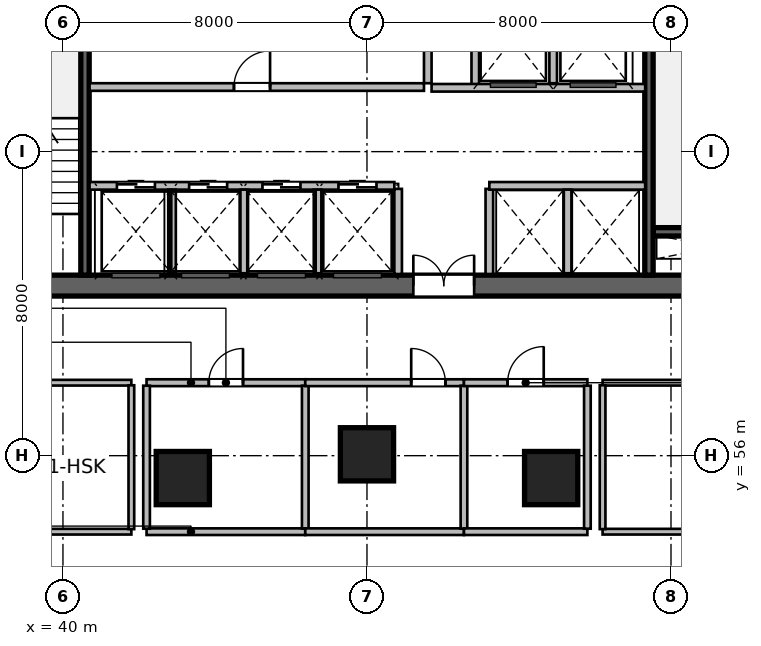
"""IFC4 building model, lengths in metres.
Left out: names, types, materials, properties, quantities, classifications, styles, units other than length and angle.
Written with IfcOpenShell. Run it as: python <this file> out.ifc"""

import sys

from ifc_helpers import new_model, si_unit, direction, frame, frame_2d, origin, origin_2d, place, context, subcontext, project, spatial, rectangle, circle, extrude, source, transform, mapped, element, fill, save


model = new_model("IFC4")
c1 = context("Model", 3, precision=1e-05, world=origin(), true_north=direction((0.0, 1.0)))
c2 = subcontext(c1, "Body", "Model", "MODEL_VIEW")
j1 = project(units=[si_unit("LENGTHUNIT", "METRE"), si_unit("PLANEANGLEUNIT", "RADIAN")], contexts=[c1])
p1 = place(None, origin())
s1 = spatial("IfcSite", under=j1, at=p1, CompositionType="ELEMENT")
p2 = place(p1, origin())
s2 = spatial("IfcBuilding", under=s1, at=p2, CompositionType="ELEMENT")
p3 = place(p2, frame((0.0, 0.0, 53.4)))
s3 = spatial("IfcBuildingStorey", under=s2, at=p3, CompositionType="ELEMENT", Elevation=53.4)
m1 = source(origin(), c2, "Body", "SweptSolid", [
    extrude(rectangle(XDim=21.6, YDim=0.55, at=frame_2d((10.8, 0.0))), origin(), (0.0, 0.0, 1.0), 3.6),
])
p4 = place(p3, frame((37.2, 60.475, 0.0), z_axis=(0.0, 0.0, 1.0), x_axis=(1.0, 0.0, 0.0)))
e1 = element("IfcWall", 1, at=p4, inside=s3, PredefinedType="SHEAR", context=c2, shape_type="MappedRepresentation", body=[
    mapped(m1, transform((0.0, 0.0, 0.0), scale=1.0)),
])
p5 = place(p4, frame((1.1, 0.0, 0.0)))
e2 = element("IfcOpeningElement", 2, at=p5, cuts=e1, PredefinedType="OPENING", context=c2, shape_type="SweptSolid", body=[
    extrude(rectangle(XDim=1.15, YDim=2.15, at=frame_2d((0.575, 1.075))), frame((0.0, 0.285, 0.0), z_axis=(0.0, -1.0, 0.0), x_axis=(1.0, 0.0, 0.0)), (0.0, 0.0, 1.0), 0.57),
])
p6 = place(p4, frame((19.5, 0.0, 0.0)))
e3 = element("IfcOpeningElement", 3, at=p6, cuts=e1, PredefinedType="OPENING", context=c2, shape_type="SweptSolid", body=[
    extrude(rectangle(XDim=0.9, YDim=2.1, at=frame_2d((0.45, 1.05))), frame((0.0, 0.285, 0.0), z_axis=(0.0, -1.0, 0.0), x_axis=(1.0, 0.0, 0.0)), (0.0, 0.0, 1.0), 0.57),
])
p7 = place(p4, frame((12.02, 0.0, 0.0)))
e4 = element("IfcOpeningElement", 4, at=p7, cuts=e1, PredefinedType="OPENING", context=c2, shape_type="SweptSolid", body=[
    extrude(rectangle(XDim=1.6, YDim=2.15, at=frame_2d((0.8, 1.075))), frame((0.0, 0.285, 0.0), z_axis=(0.0, -1.0, 0.0), x_axis=(1.0, 0.0, 0.0)), (0.0, 0.0, 1.0), 0.57),
])
m2 = source(origin(), c2, "Body", "SweptSolid", [
    extrude(rectangle(XDim=3.27, YDim=0.22, at=frame_2d((1.635, 0.0))), origin(), (0.0, 0.0, 1.0), 3.6),
])
p8 = place(p3, frame((55.53, 61.89, 0.0), z_axis=(0.0, 0.0, 1.0), x_axis=(1.0, 0.0, 0.0)))
e5 = element("IfcWall", 5, at=p8, inside=s3, PredefinedType="SHEAR", context=c2, shape_type="MappedRepresentation", body=[
    mapped(m2, transform((0.0, 0.0, 0.0), scale=1.0)),
])
m3 = source(origin(), c2, "Body", "SweptSolid", [
    extrude(rectangle(XDim=10.9, YDim=0.22, at=frame_2d((5.45, 0.0))), origin(), (0.0, 0.0, 1.0), 3.6),
])
p9 = place(p3, frame((40.58, 60.75, 0.0), z_axis=(0.0, 0.0, 1.0), x_axis=(0.0, 1.0, 0.0)))
e6 = element("IfcWall", 6, at=p9, inside=s3, PredefinedType="SHEAR", context=c2, shape_type="MappedRepresentation", body=[
    mapped(m3, transform((0.0, 0.0, 0.0), scale=1.0)),
])
p10 = place(p3, frame((55.42, 60.75, 0.0), z_axis=(0.0, 0.0, 1.0), x_axis=(0.0, 1.0, 0.0)))
e7 = element("IfcWall", 7, at=p10, inside=s3, PredefinedType="SHEAR", context=c2, shape_type="MappedRepresentation", body=[
    mapped(m3, transform((0.0, 0.0, 0.0), scale=1.0)),
])
p11 = place(p10, frame((9.495, 0.0, 0.0)))
e8 = element("IfcOpeningElement", 8, at=p11, cuts=e7, PredefinedType="OPENING", context=c2, shape_type="SweptSolid", body=[
    extrude(rectangle(XDim=1.15, YDim=2.15, at=frame_2d((0.575, 1.075))), frame((0.0, 0.12, 0.0), z_axis=(0.0, -1.0, 0.0), x_axis=(1.0, 0.0, 0.0)), (0.0, 0.0, 1.0), 0.24),
])
m4 = source(origin(), c2, "Body", "SweptSolid", [
    extrude(circle(Radius=0.7, at=origin_2d()), origin(), (0.0, 0.0, 1.0), 3.6),
])
for number, where, z_axis, x_axis in (
    (9, (43.154, 55.411, 0.0), (0.0, 0.0, 1.0), (-0.143, 0.99, 0.0)),
    (10, (48.0, 56.036, 0.0), (0.0, 0.0, 1.0), (0.0, 1.0, 0.0)),
    (11, (52.846, 55.411, 0.0), (0.0, 0.0, 1.0), (0.143, 0.99, 0.0)),
):
    element("IfcColumn", number, at=place(p3, frame(where, z_axis=z_axis, x_axis=x_axis)), inside=s3, PredefinedType="COLUMN", context=c2, shape_type="MappedRepresentation", body=[
        mapped(m4, transform((0.0, 0.0, 0.0), scale=1.0)),
    ])
m5 = source(origin(), c2, "Body", "SweptSolid", [
    extrude(rectangle(XDim=2.24, YDim=0.2, at=frame_2d((1.12, 0.0))), origin(), (0.0, 0.0, 1.0), 3.36),
])
for number, where, z_axis, x_axis in (
    (12, (48.82, 60.78, 0.0), (0.0, 0.0, 1.0), (0.0, 1.0, 0.0)),
    (13, (51.22, 60.78, 0.0), (0.0, 0.0, 1.0), (0.0, 1.0, 0.0)),
):
    element("IfcWall", number, at=place(p3, frame(where, z_axis=z_axis, x_axis=x_axis)), inside=s3, PredefinedType="SOLIDWALL", context=c2, shape_type="MappedRepresentation", body=[
        mapped(m5, transform((0.0, 0.0, 0.0), scale=1.0)),
    ])
m6 = source(origin(), c2, "Body", "SweptSolid", [
    extrude(rectangle(XDim=5.8, YDim=0.2, at=frame_2d((2.9, 0.0))), origin(), (0.0, 0.0, 1.0), 3.36),
])
p12 = place(p3, frame((49.6, 65.8, 0.0), z_axis=(0.0, 0.0, 1.0), x_axis=(0.0, 1.0, 0.0)))
e14 = element("IfcWall", 14, at=p12, inside=s3, PredefinedType="SOLIDWALL", context=c2, shape_type="MappedRepresentation", body=[
    mapped(m6, transform((0.0, 0.0, 0.0), scale=1.0)),
])
m7 = source(origin(), c2, "Body", "SweptSolid", [
    extrude(rectangle(XDim=2.58, YDim=0.2, at=frame_2d((1.29, 0.0))), origin(), (0.0, 0.0, 1.0), 3.36),
])
p13 = place(p3, frame((50.85, 65.68, 0.0), z_axis=(0.0, 0.0, 1.0), x_axis=(0.0, 1.0, 0.0)))
e15 = element("IfcWall", 15, at=p13, inside=s3, PredefinedType="SOLIDWALL", context=c2, shape_type="MappedRepresentation", body=[
    mapped(m7, transform((0.0, 0.0, 0.0), scale=1.0)),
])
m8 = source(origin(), c2, "Body", "SweptSolid", [
    extrude(rectangle(XDim=2.4, YDim=0.2, at=frame_2d((1.2, 0.0))), origin(), (0.0, 0.0, 1.0), 3.36),
])
p14 = place(p3, frame((52.9, 65.8, 0.0), z_axis=(0.0, 0.0, 1.0), x_axis=(0.0, 1.0, 0.0)))
e16 = element("IfcWall", 16, at=p14, inside=s3, PredefinedType="SOLIDWALL", context=c2, shape_type="MappedRepresentation", body=[
    mapped(m8, transform((0.0, 0.0, 0.0), scale=1.0)),
])
m9 = source(origin(), c2, "Body", "SweptSolid", [
    extrude(rectangle(XDim=5.62, YDim=0.2, at=frame_2d((2.81, 0.0))), origin(), (0.0, 0.0, 1.0), 3.36),
])
p15 = place(p3, frame((49.7, 65.68, 0.0), z_axis=(0.0, 0.0, 1.0), x_axis=(1.0, 0.0, 0.0)))
e17 = element("IfcWall", 17, at=p15, inside=s3, PredefinedType="SOLIDWALL", context=c2, shape_type="MappedRepresentation", body=[
    mapped(m9, transform((0.0, 0.0, 0.0), scale=1.0)),
])
m10 = source(origin(), c2, "Body", "SweptSolid", [
    extrude(rectangle(XDim=8.02, YDim=0.2, at=frame_2d((4.01, 0.0))), origin(), (0.0, 0.0, 1.0), 3.36),
])
p16 = place(p3, frame((40.7, 63.1, 0.0), z_axis=(0.0, 0.0, 1.0), x_axis=(1.0, 0.0, 0.0)))
e18 = element("IfcWall", 18, at=p16, inside=s3, PredefinedType="SOLIDWALL", context=c2, shape_type="MappedRepresentation", body=[
    mapped(m10, transform((0.0, 0.0, 0.0), scale=1.0)),
])
p17 = place(p16, frame((0.72, 0.0, 0.0)))
e19 = element("IfcOpeningElement", 19, at=p17, cuts=e18, PredefinedType="OPENING", context=c2, shape_type="SweptSolid", body=[
    extrude(rectangle(XDim=1.0, YDim=2.15, at=frame_2d((0.5, 1.075))), frame((0.0, 0.11, 0.0), z_axis=(0.0, -1.0, 0.0), x_axis=(1.0, 0.0, 0.0)), (0.0, 0.0, 1.0), 0.22),
])
p18 = place(p16, frame((2.62, 0.0, 0.0)))
e20 = element("IfcOpeningElement", 20, at=p18, cuts=e18, PredefinedType="OPENING", context=c2, shape_type="SweptSolid", body=[
    extrude(rectangle(XDim=1.0, YDim=2.15, at=frame_2d((0.5, 1.075))), frame((0.0, 0.11, 0.0), z_axis=(0.0, -1.0, 0.0), x_axis=(1.0, 0.0, 0.0)), (0.0, 0.0, 1.0), 0.22),
])
p19 = place(p16, frame((4.55, 0.0, 0.0)))
e21 = element("IfcOpeningElement", 21, at=p19, cuts=e18, PredefinedType="OPENING", context=c2, shape_type="SweptSolid", body=[
    extrude(rectangle(XDim=1.0, YDim=2.15, at=frame_2d((0.5, 1.075))), frame((0.0, 0.11, 0.0), z_axis=(0.0, -1.0, 0.0), x_axis=(1.0, 0.0, 0.0)), (0.0, 0.0, 1.0), 0.22),
])
p20 = place(p16, frame((6.55, 0.0, 0.0)))
e22 = element("IfcOpeningElement", 22, at=p20, cuts=e18, PredefinedType="OPENING", context=c2, shape_type="SweptSolid", body=[
    extrude(rectangle(XDim=1.0, YDim=2.15, at=frame_2d((0.5, 1.075))), frame((0.0, 0.11, 0.0), z_axis=(0.0, -1.0, 0.0), x_axis=(1.0, 0.0, 0.0)), (0.0, 0.0, 1.0), 0.22),
])
m11 = source(origin(), c2, "Body", "SweptSolid", [
    extrude(rectangle(XDim=4.1, YDim=0.2, at=frame_2d((2.05, 0.0))), origin(), (0.0, 0.0, 1.0), 3.36),
])
p21 = place(p3, frame((51.22, 63.1, 0.0), z_axis=(0.0, 0.0, 1.0), x_axis=(1.0, 0.0, 0.0)))
e23 = element("IfcWall", 23, at=p21, inside=s3, PredefinedType="SOLIDWALL", context=c2, shape_type="MappedRepresentation", body=[
    mapped(m11, transform((0.0, 0.0, 0.0), scale=1.0)),
])
m12 = source(origin(), c2, "Body", "SweptSolid", [
    extrude(rectangle(XDim=2.2, YDim=0.2, at=frame_2d((1.1, 0.0))), origin(), (0.0, 0.0, 1.0), 3.36),
])
for number, where, z_axis, x_axis in (
    (24, (42.87, 60.8, 0.0), (0.0, 0.0, 1.0), (0.0, 1.0, 0.0)),
    (25, (44.77, 60.8, 0.0), (0.0, 0.0, 1.0), (0.0, 1.0, 0.0)),
    (26, (46.7, 60.8, 0.0), (0.0, 0.0, 1.0), (0.0, 1.0, 0.0)),
    (27, (53.28, 60.8, 0.0), (0.0, 0.0, 1.0), (0.0, 1.0, 0.0)),
):
    element("IfcWall", number, at=place(p3, frame(where, z_axis=z_axis, x_axis=x_axis)), inside=s3, PredefinedType="SOLIDWALL", context=c2, shape_type="MappedRepresentation", body=[
        mapped(m12, transform((0.0, 0.0, 0.0), scale=1.0)),
    ])
m13 = source(origin(), c2, "Body", "SweptSolid", [
    extrude(rectangle(XDim=8.8, YDim=0.2, at=frame_2d((4.4, 0.0))), origin(), (0.0, 0.0, 1.0), 3.36),
])
p22 = place(p3, frame((40.7, 65.7, 0.0), z_axis=(0.0, 0.0, 1.0), x_axis=(1.0, 0.0, 0.0)))
e28 = element("IfcWall", 28, at=p22, inside=s3, PredefinedType="SOLIDWALL", context=c2, shape_type="MappedRepresentation", body=[
    mapped(m13, transform((0.0, 0.0, 0.0), scale=1.0)),
])
p23 = place(p22, frame((3.8, 0.0, 0.0)))
e29 = element("IfcOpeningElement", 29, at=p23, cuts=e28, PredefinedType="OPENING", context=c2, shape_type="SweptSolid", body=[
    extrude(rectangle(XDim=0.95, YDim=2.15, at=frame_2d((0.475, 1.075))), frame((0.0, 0.11, 0.0), z_axis=(0.0, -1.0, 0.0), x_axis=(1.0, 0.0, 0.0)), (0.0, 0.0, 1.0), 0.22),
])
m14 = source(origin(), c2, "Body", "SweptSolid", [
    extrude(rectangle(XDim=6.6, YDim=0.15, at=frame_2d((3.3, 0.0))), origin(), (0.0, 0.0, 1.0), 2.803),
])
p24 = place(p3, frame((35.2, 54.0, 0.0), z_axis=(0.0, 0.0, 1.0), x_axis=(1.0, 0.0, 0.0)))
e30 = element("IfcWall", 30, at=p24, inside=s3, PredefinedType="PARTITIONING", context=c2, shape_type="MappedRepresentation", body=[
    mapped(m14, transform((0.0, 0.0, 0.0), scale=1.0)),
])
m15 = source(origin(), c2, "Body", "SweptSolid", [
    extrude(rectangle(XDim=6.6, YDim=0.15, at=frame_2d((3.3, 0.0))), origin(), (0.0, 0.0, 1.0), 3.36),
])
p25 = place(p3, frame((35.2, 57.92, 0.0), z_axis=(0.0, 0.0, 1.0), x_axis=(1.0, 0.0, 0.0)))
e31 = element("IfcWall", 31, at=p25, inside=s3, PredefinedType="PARTITIONING", context=c2, shape_type="MappedRepresentation", body=[
    mapped(m15, transform((0.0, 0.0, 0.0), scale=1.0)),
])
p26 = place(p25, frame((2.85, 0.0, 0.0)))
e32 = element("IfcOpeningElement", 32, at=p26, cuts=e31, PredefinedType="OPENING", context=c2, shape_type="SweptSolid", body=[
    extrude(rectangle(XDim=0.9, YDim=2.1, at=frame_2d((0.45, 1.05))), frame((0.0, 0.085, 0.0), z_axis=(0.0, -1.0, 0.0), x_axis=(1.0, 0.0, 0.0)), (0.0, 0.0, 1.0), 0.17),
])
m16 = source(origin(), c2, "Body", "SweptSolid", [
    extrude(rectangle(XDim=3.785, YDim=0.15, at=frame_2d((1.893, 0.0))), origin(), (0.0, 0.0, 1.0), 3.36),
])
p27 = place(p3, frame((41.8, 54.067, 0.0), z_axis=(0.0, 0.0, 1.0), x_axis=(0.0, 1.0, 0.0)))
e33 = element("IfcWall", 33, at=p27, inside=s3, PredefinedType="PARTITIONING", context=c2, shape_type="MappedRepresentation", body=[
    mapped(m16, transform((0.0, 0.0, 0.0), scale=1.0)),
])
m17 = source(origin(), c2, "Body", "SweptSolid", [
    extrude(rectangle(XDim=4.176, YDim=0.175, at=frame_2d((2.088, 0.0))), origin(), (0.0, 0.0, 1.0), 3.36),
])
p28 = place(p3, frame((42.2, 54.0, 0.0), z_axis=(0.0, 0.0, 1.0), x_axis=(1.0, 0.0, 0.0)))
e34 = element("IfcWall", 34, at=p28, inside=s3, PredefinedType="PARTITIONING", context=c2, shape_type="MappedRepresentation", body=[
    mapped(m17, transform((0.0, 0.0, 0.0), scale=1.0)),
])
m18 = source(origin(), c2, "Body", "SweptSolid", [
    extrude(rectangle(XDim=4.176, YDim=0.18, at=frame_2d((2.088, 0.0))), origin(), (0.0, 0.0, 1.0), 3.36),
])
p29 = place(p3, frame((42.2, 57.92, 0.0), z_axis=(0.0, 0.0, 1.0), x_axis=(1.0, 0.0, 0.0)))
e35 = element("IfcWall", 35, at=p29, inside=s3, PredefinedType="PLUMBINGWALL", context=c2, shape_type="MappedRepresentation", body=[
    mapped(m18, transform((0.0, 0.0, 0.0), scale=1.0)),
])
p30 = place(p29, frame((1.638, 0.0, 0.0)))
e36 = element("IfcOpeningElement", 36, at=p30, cuts=e35, PredefinedType="OPENING", context=c2, shape_type="SweptSolid", body=[
    extrude(rectangle(XDim=0.9, YDim=2.08, at=frame_2d((0.45, 1.04))), frame((0.0, 0.1, 0.0), z_axis=(0.0, -1.0, 0.0), x_axis=(1.0, 0.0, 0.0)), (0.0, 0.0, 1.0), 0.2),
])
m19 = source(origin(), c2, "Body", "SweptSolid", [
    extrude(rectangle(XDim=3.763, YDim=0.175, at=frame_2d((1.881, 0.0))), origin(), (0.0, 0.0, 1.0), 3.36),
])
for number, where, z_axis, x_axis in (
    (37, (42.2, 54.079, 0.0), (0.0, 0.0, 1.0), (0.0, 1.0, 0.0)),
    (38, (46.376, 54.079, 0.0), (0.0, 0.0, 1.0), (0.0, 1.0, 0.0)),
):
    element("IfcWall", number, at=place(p3, frame(where, z_axis=z_axis, x_axis=x_axis)), inside=s3, PredefinedType="PARTITIONING", context=c2, shape_type="MappedRepresentation", body=[
        mapped(m19, transform((0.0, 0.0, 0.0), scale=1.0)),
    ])
p31 = place(p3, frame((46.376, 54.0, 0.0), z_axis=(0.0, 0.0, 1.0), x_axis=(1.0, 0.0, 0.0)))
e39 = element("IfcWall", 39, at=p31, inside=s3, PredefinedType="PARTITIONING", context=c2, shape_type="MappedRepresentation", body=[
    mapped(m17, transform((0.0, 0.0, 0.0), scale=1.0)),
])
p32 = place(p3, frame((46.376, 57.92, 0.0), z_axis=(0.0, 0.0, 1.0), x_axis=(1.0, 0.0, 0.0)))
e40 = element("IfcWall", 40, at=p32, inside=s3, PredefinedType="PLUMBINGWALL", context=c2, shape_type="MappedRepresentation", body=[
    mapped(m18, transform((0.0, 0.0, 0.0), scale=1.0)),
])
p33 = place(p32, frame((2.788, 0.0, 0.0)))
e41 = element("IfcOpeningElement", 41, at=p33, cuts=e40, PredefinedType="OPENING", context=c2, shape_type="SweptSolid", body=[
    extrude(rectangle(XDim=0.9, YDim=2.08, at=frame_2d((0.45, 1.04))), frame((0.0, 0.1, 0.0), z_axis=(0.0, -1.0, 0.0), x_axis=(1.0, 0.0, 0.0)), (0.0, 0.0, 1.0), 0.2),
])
p34 = place(p3, frame((50.552, 54.079, 0.0), z_axis=(0.0, 0.0, 1.0), x_axis=(0.0, 1.0, 0.0)))
e42 = element("IfcWall", 42, at=p34, inside=s3, PredefinedType="PARTITIONING", context=c2, shape_type="MappedRepresentation", body=[
    mapped(m19, transform((0.0, 0.0, 0.0), scale=1.0)),
])
m20 = source(origin(), c2, "Body", "SweptSolid", [
    extrude(rectangle(XDim=3.248, YDim=0.175, at=frame_2d((1.624, 0.0))), origin(), (0.0, 0.0, 1.0), 3.36),
])
p35 = place(p3, frame((50.552, 54.0, 0.0), z_axis=(0.0, 0.0, 1.0), x_axis=(1.0, 0.0, 0.0)))
e43 = element("IfcWall", 43, at=p35, inside=s3, PredefinedType="PARTITIONING", context=c2, shape_type="MappedRepresentation", body=[
    mapped(m20, transform((0.0, 0.0, 0.0), scale=1.0)),
])
m21 = source(origin(), c2, "Body", "SweptSolid", [
    extrude(rectangle(XDim=3.248, YDim=0.18, at=frame_2d((1.624, 0.0))), origin(), (0.0, 0.0, 1.0), 3.36),
])
p36 = place(p3, frame((50.552, 57.92, 0.0), z_axis=(0.0, 0.0, 1.0), x_axis=(1.0, 0.0, 0.0)))
e44 = element("IfcWall", 44, at=p36, inside=s3, PredefinedType="PLUMBINGWALL", context=c2, shape_type="MappedRepresentation", body=[
    mapped(m21, transform((0.0, 0.0, 0.0), scale=1.0)),
])
p37 = place(p36, frame((1.149, 0.0, 0.0)))
e45 = element("IfcOpeningElement", 45, at=p37, cuts=e44, PredefinedType="OPENING", context=c2, shape_type="SweptSolid", body=[
    extrude(rectangle(XDim=0.95, YDim=2.12, at=frame_2d((0.475, 1.06))), frame((0.0, 0.1, 0.0), z_axis=(0.0, -1.0, 0.0), x_axis=(1.0, 0.0, 0.0)), (0.0, 0.0, 1.0), 0.2),
])
p38 = place(p3, frame((53.8, 54.079, 0.0), z_axis=(0.0, 0.0, 1.0), x_axis=(0.0, 1.0, 0.0)))
e46 = element("IfcWall", 46, at=p38, inside=s3, PredefinedType="PARTITIONING", context=c2, shape_type="MappedRepresentation", body=[
    mapped(m19, transform((0.0, 0.0, 0.0), scale=1.0)),
])
p39 = place(p3, frame((54.2, 54.0, 0.0), z_axis=(0.0, 0.0, 1.0), x_axis=(1.0, 0.0, 0.0)))
e47 = element("IfcWall", 47, at=p39, inside=s3, PredefinedType="PARTITIONING", context=c2, shape_type="MappedRepresentation", body=[
    mapped(m14, transform((0.0, 0.0, 0.0), scale=1.0)),
])
p40 = place(p3, frame((54.2, 57.92, 0.0), z_axis=(0.0, 0.0, 1.0), x_axis=(1.0, 0.0, 0.0)))
e48 = element("IfcWall", 48, at=p40, inside=s3, PredefinedType="PARTITIONING", context=c2, shape_type="MappedRepresentation", body=[
    mapped(m15, transform((0.0, 0.0, 0.0), scale=1.0)),
])
p41 = place(p40, frame((2.825, 0.0, 0.0)))
e49 = element("IfcOpeningElement", 49, at=p41, cuts=e48, PredefinedType="OPENING", context=c2, shape_type="SweptSolid", body=[
    extrude(rectangle(XDim=0.95, YDim=2.1, at=frame_2d((0.475, 1.05))), frame((0.0, 0.085, 0.0), z_axis=(0.0, -1.0, 0.0), x_axis=(1.0, 0.0, 0.0)), (0.0, 0.0, 1.0), 0.17),
])
p42 = place(p3, frame((54.2, 54.067, 0.0), z_axis=(0.0, 0.0, 1.0), x_axis=(0.0, 1.0, 0.0)))
e50 = element("IfcWall", 50, at=p42, inside=s3, PredefinedType="PARTITIONING", context=c2, shape_type="MappedRepresentation", body=[
    mapped(m16, transform((0.0, 0.0, 0.0), scale=1.0)),
])
m22 = source(origin(), c2, "Body", "SweptSolid", [
    extrude(rectangle(XDim=1.6, YDim=2.15, at=frame_2d((0.8, 1.075))), frame((0.0, 0.025, 0.0), z_axis=(0.0, -1.0, 0.0), x_axis=(1.0, 0.0, 0.0)), (0.0, 0.0, 1.0), 0.05),
])
p43 = place(p7, origin())
e51 = element("IfcDoor", 51, at=p43, inside=s3, OperationType="DOUBLE_DOOR_SINGLE_SWING", PredefinedType="DOOR", context=c2, shape_type="MappedRepresentation", body=[
    mapped(m22, transform((0.0, 0.0, 0.0), scale=1.0)),
])
fill(e4, e51)
m23 = source(origin(), c2, "Body", "SweptSolid", [
    extrude(rectangle(XDim=1.0, YDim=2.15, at=frame_2d((0.5, 1.075))), frame((0.0, 0.025, 0.0), z_axis=(0.0, -1.0, 0.0), x_axis=(1.0, 0.0, 0.0)), (0.0, 0.0, 1.0), 0.05),
])
p44 = place(p17, origin())
e52 = element("IfcDoor", 52, at=p44, inside=s3, OperationType="DOUBLE_DOOR_SLIDING", PredefinedType="DOOR", context=c2, shape_type="MappedRepresentation", body=[
    mapped(m23, transform((0.0, 0.0, 0.0), scale=1.0)),
])
fill(e19, e52)
p45 = place(p18, origin())
e53 = element("IfcDoor", 53, at=p45, inside=s3, OperationType="DOUBLE_DOOR_SLIDING", PredefinedType="DOOR", context=c2, shape_type="MappedRepresentation", body=[
    mapped(m23, transform((0.0, 0.0, 0.0), scale=1.0)),
])
fill(e20, e53)
p46 = place(p19, origin())
e54 = element("IfcDoor", 54, at=p46, inside=s3, OperationType="DOUBLE_DOOR_SLIDING", PredefinedType="DOOR", context=c2, shape_type="MappedRepresentation", body=[
    mapped(m23, transform((0.0, 0.0, 0.0), scale=1.0)),
])
fill(e21, e54)
p47 = place(p20, origin())
e55 = element("IfcDoor", 55, at=p47, inside=s3, OperationType="DOUBLE_DOOR_SLIDING", PredefinedType="DOOR", context=c2, shape_type="MappedRepresentation", body=[
    mapped(m23, transform((0.0, 0.0, 0.0), scale=1.0)),
])
fill(e22, e55)
m24 = source(origin(), c2, "Body", "SweptSolid", [
    extrude(rectangle(XDim=0.95, YDim=2.15, at=frame_2d((0.475, 1.075))), frame((0.0, 0.025, 0.0), z_axis=(0.0, -1.0, 0.0), x_axis=(1.0, 0.0, 0.0)), (0.0, 0.0, 1.0), 0.05),
])
p48 = place(p23, origin())
e56 = element("IfcDoor", 56, at=p48, inside=s3, OperationType="SINGLE_SWING_RIGHT", PredefinedType="DOOR", context=c2, shape_type="MappedRepresentation", body=[
    mapped(m24, transform((0.0, 0.0, 0.0), scale=1.0)),
])
fill(e29, e56)
m25 = source(origin(), c2, "Body", "SweptSolid", [
    extrude(rectangle(XDim=0.9, YDim=2.08, at=frame_2d((0.45, 1.04))), frame((0.0, 0.025, 0.0), z_axis=(0.0, -1.0, 0.0), x_axis=(1.0, 0.0, 0.0)), (0.0, 0.0, 1.0), 0.05),
])
p49 = place(p30, origin())
e57 = element("IfcDoor", 57, at=p49, inside=s3, OperationType="SINGLE_SWING_RIGHT", PredefinedType="DOOR", context=c2, shape_type="MappedRepresentation", body=[
    mapped(m25, transform((0.0, 0.0, 0.0), scale=1.0)),
])
fill(e36, e57)
p50 = place(p33, origin())
e58 = element("IfcDoor", 58, at=p50, inside=s3, OperationType="SINGLE_SWING_LEFT", PredefinedType="DOOR", context=c2, shape_type="MappedRepresentation", body=[
    mapped(m25, transform((0.0, 0.0, 0.0), scale=1.0)),
])
fill(e41, e58)
m26 = source(origin(), c2, "Body", "SweptSolid", [
    extrude(rectangle(XDim=0.95, YDim=2.12, at=frame_2d((0.475, 1.06))), frame((0.0, 0.025, 0.0), z_axis=(0.0, -1.0, 0.0), x_axis=(1.0, 0.0, 0.0)), (0.0, 0.0, 1.0), 0.05),
])
p51 = place(p37, origin())
e59 = element("IfcDoor", 59, at=p51, inside=s3, OperationType="SINGLE_SWING_RIGHT", PredefinedType="DOOR", context=c2, shape_type="MappedRepresentation", body=[
    mapped(m26, transform((0.0, 0.0, 0.0), scale=1.0)),
])
fill(e45, e59)
save(model, sys.argv[1])
